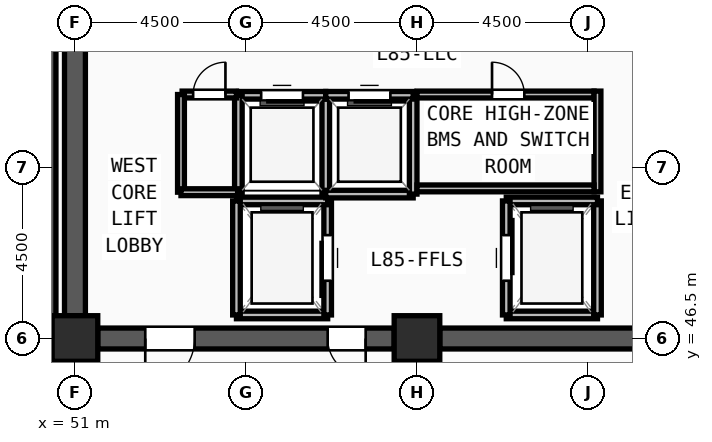
"""IFC4 building model, lengths in metres.
Left out: names, types, materials, properties, quantities, classifications, styles, units other than length and angle.
Written with IfcOpenShell. Run it as: python <this file> out.ifc"""

import sys

from ifc_helpers import new_model, si_unit, direction, frame, frame_2d, origin, origin_2d, place, context, subcontext, project, spatial, rectangle, extrude, source, transform, mapped, element, fill, save


model = new_model("IFC4")
c1 = context("Model", 3, precision=1e-05, world=origin(), true_north=direction((0.0, 1.0)))
c2 = subcontext(c1, "Body", "Model", "MODEL_VIEW")
j1 = project(units=[si_unit("LENGTHUNIT", "METRE"), si_unit("PLANEANGLEUNIT", "RADIAN")], contexts=[c1])
p1 = place(None, origin())
s1 = spatial("IfcSite", under=j1, at=p1, CompositionType="ELEMENT")
p2 = place(p1, origin())
s2 = spatial("IfcBuilding", under=s1, at=p2, CompositionType="ELEMENT")
p3 = place(p2, frame((0.0, 0.0, 328.5)))
s3 = spatial("IfcBuildingStorey", under=s2, at=p3, CompositionType="ELEMENT", Elevation=328.5)
m1 = source(origin(), c2, "Body", "SweptSolid", [
    extrude(rectangle(XDim=1.2, YDim=1.2, at=origin_2d()), origin(), (0.0, 0.0, 1.0), 3.75),
])
for number, where, z_axis, x_axis in (
    (1, (51.0, 46.5, 0.0), (0.0, 0.0, 1.0), (1.0, 0.0, 0.0)),
    (2, (60.0, 46.5, 0.0), (0.0, 0.0, 1.0), (1.0, 0.0, 0.0)),
):
    element("IfcColumn", number, at=place(p3, frame(where, z_axis=z_axis, x_axis=x_axis)), inside=s3, PredefinedType="COLUMN", context=c2, shape_type="MappedRepresentation", body=[
        mapped(m1, transform((0.0, 0.0, 0.0), x_axis=(1.0, 0.0, 0.0), y_axis=(0.0, 1.0, 0.0), z_axis=(0.0, 0.0, 1.0), scale=1.0)),
    ])
p4 = place(p3, frame((68.4, 46.5, 0.0), z_axis=(0.0, 0.0, 1.0), x_axis=(-1.0, 0.0, 0.0)))
e3 = element("IfcWall", 3, at=p4, inside=s3, PredefinedType="SHEAR", context=c2, shape_type="SweptSolid", body=[
    extrude(rectangle(XDim=7.8, YDim=0.55, at=frame_2d((3.9, 0.0))), origin(), (0.0, 0.0, 1.0), 3.57),
])
m2 = source(origin(), c2, "Body", "SweptSolid", [
    extrude(rectangle(XDim=1.3, YDim=2.2, at=frame_2d((0.65, 1.1))), frame((0.0, 0.285, 0.0), z_axis=(0.0, -1.0, 0.0), x_axis=(1.0, 0.0, 0.0)), (0.0, 0.0, 1.0), 0.57),
])
p5 = place(p4, frame((1.25, 0.0, 0.0)))
e4 = element("IfcOpeningElement", 4, at=p5, cuts=e3, PredefinedType="OPENING", context=c2, shape_type="MappedRepresentation", body=[
    mapped(m2, transform((0.0, 0.0, 0.0), x_axis=(1.0, 0.0, 0.0), y_axis=(0.0, 1.0, 0.0), z_axis=(0.0, 0.0, 1.0), scale=1.0)),
])
p6 = place(p3, frame((59.4, 46.5, 0.0), z_axis=(0.0, 0.0, 1.0), x_axis=(-1.0, 0.0, 0.0)))
e5 = element("IfcWall", 5, at=p6, inside=s3, PredefinedType="SHEAR", context=c2, shape_type="SweptSolid", body=[
    extrude(rectangle(XDim=7.8, YDim=0.55, at=frame_2d((3.9, 0.0))), origin(), (0.0, 0.0, 1.0), 3.57),
])
p7 = place(p6, frame((5.25, 0.0, 0.0)))
e6 = element("IfcOpeningElement", 6, at=p7, cuts=e5, PredefinedType="OPENING", context=c2, shape_type="MappedRepresentation", body=[
    mapped(m2, transform((0.0, 0.0, 0.0), x_axis=(1.0, 0.0, 0.0), y_axis=(0.0, 1.0, 0.0), z_axis=(0.0, 0.0, 1.0), scale=1.0)),
])
m3 = source(origin(), c2, "Body", "SweptSolid", [
    extrude(rectangle(XDim=1.0, YDim=2.2, at=frame_2d((0.5, 1.1))), frame((0.0, 0.285, 0.0), z_axis=(0.0, -1.0, 0.0), x_axis=(1.0, 0.0, 0.0)), (0.0, 0.0, 1.0), 0.57),
])
p8 = place(p6, frame((0.75, 0.0, 0.0)))
e7 = element("IfcOpeningElement", 7, at=p8, cuts=e5, PredefinedType="OPENING", context=c2, shape_type="MappedRepresentation", body=[
    mapped(m3, transform((0.0, 0.0, 0.0), x_axis=(1.0, 0.0, 0.0), y_axis=(0.0, 1.0, 0.0), z_axis=(0.0, 0.0, 1.0), scale=1.0)),
])
p9 = place(p3, frame((51.0, 47.1, 0.0), z_axis=(0.0, 0.0, 1.0), x_axis=(0.0, 1.0, 0.0)))
e8 = element("IfcWall", 8, at=p9, inside=s3, PredefinedType="SHEAR", context=c2, shape_type="SweptSolid", body=[
    extrude(rectangle(XDim=13.8, YDim=0.55, at=frame_2d((6.9, 0.0))), origin(), (0.0, 0.0, 1.0), 3.57),
])
p10 = place(p3, frame((50.38, 46.7, 0.0), z_axis=(0.0, 0.0, 1.0), x_axis=(0.0, 1.0, 0.0)))
e9 = element("IfcWall", 9, at=p10, inside=s3, PredefinedType="SOLIDWALL", context=c2, shape_type="SweptSolid", body=[
    extrude(rectangle(XDim=7.82, YDim=0.24, at=frame_2d((3.91, 0.0))), origin(), (0.0, 0.0, 1.0), 3.57),
])
p11 = place(p3, frame((55.25, 47.12, 0.0), z_axis=(0.0, 0.0, 1.0), x_axis=(1.0, 0.0, 0.0)))
e10 = element("IfcWall", 10, at=p11, inside=s3, PredefinedType="SOLIDWALL", context=c2, shape_type="SweptSolid", body=[
    extrude(rectangle(XDim=2.4, YDim=0.2, at=frame_2d((1.2, 0.0))), origin(), (0.0, 0.0, 1.0), 3.57),
])
p12 = place(p3, frame((57.65, 47.12, 0.0), z_axis=(0.0, 0.0, 1.0), x_axis=(0.0, 1.0, 0.0)))
e11 = element("IfcWall", 11, at=p12, inside=s3, PredefinedType="SOLIDWALL", context=c2, shape_type="SweptSolid", body=[
    extrude(rectangle(XDim=3.0, YDim=0.2, at=frame_2d((1.5, 0.0))), origin(), (0.0, 0.0, 1.0), 3.57),
])
m4 = source(origin(), c2, "Body", "SweptSolid", [
    extrude(rectangle(XDim=1.2, YDim=2.3, at=frame_2d((0.6, 1.15))), frame((0.0, 0.11, 0.0), z_axis=(0.0, -1.0, 0.0), x_axis=(1.0, 0.0, 0.0)), (0.0, 0.0, 1.0), 0.22),
])
p13 = place(p12, frame((0.9, 0.0, 0.0)))
e12 = element("IfcOpeningElement", 12, at=p13, cuts=e11, PredefinedType="OPENING", context=c2, shape_type="MappedRepresentation", body=[
    mapped(m4, transform((0.0, 0.0, 0.0), x_axis=(1.0, 0.0, 0.0), y_axis=(0.0, 1.0, 0.0), z_axis=(0.0, 0.0, 1.0), scale=1.0)),
])
p14 = place(p3, frame((57.65, 50.12, 0.0), z_axis=(0.0, 0.0, 1.0), x_axis=(-1.0, 0.0, 0.0)))
e13 = element("IfcWall", 13, at=p14, inside=s3, PredefinedType="SOLIDWALL", context=c2, shape_type="SweptSolid", body=[
    extrude(rectangle(XDim=2.4, YDim=0.2, at=frame_2d((1.2, 0.0))), origin(), (0.0, 0.0, 1.0), 3.57),
])
p15 = place(p3, frame((55.25, 50.12, 0.0), z_axis=(0.0, 0.0, 1.0), x_axis=(0.0, -1.0, 0.0)))
e14 = element("IfcWall", 14, at=p15, inside=s3, PredefinedType="SOLIDWALL", context=c2, shape_type="SweptSolid", body=[
    extrude(rectangle(XDim=3.0, YDim=0.2, at=frame_2d((1.5, 0.0))), origin(), (0.0, 0.0, 1.0), 3.57),
])
p16 = place(p3, frame((62.35, 47.12, 0.0), z_axis=(0.0, 0.0, 1.0), x_axis=(1.0, 0.0, 0.0)))
e15 = element("IfcWall", 15, at=p16, inside=s3, PredefinedType="SOLIDWALL", context=c2, shape_type="SweptSolid", body=[
    extrude(rectangle(XDim=2.4, YDim=0.2, at=frame_2d((1.2, 0.0))), origin(), (0.0, 0.0, 1.0), 3.57),
])
p17 = place(p3, frame((64.75, 47.12, 0.0), z_axis=(0.0, 0.0, 1.0), x_axis=(0.0, 1.0, 0.0)))
e16 = element("IfcWall", 16, at=p17, inside=s3, PredefinedType="SOLIDWALL", context=c2, shape_type="SweptSolid", body=[
    extrude(rectangle(XDim=3.0, YDim=0.2, at=frame_2d((1.5, 0.0))), origin(), (0.0, 0.0, 1.0), 3.57),
])
p18 = place(p3, frame((64.75, 50.12, 0.0), z_axis=(0.0, 0.0, 1.0), x_axis=(-1.0, 0.0, 0.0)))
e17 = element("IfcWall", 17, at=p18, inside=s3, PredefinedType="SOLIDWALL", context=c2, shape_type="SweptSolid", body=[
    extrude(rectangle(XDim=2.4, YDim=0.2, at=frame_2d((1.2, 0.0))), origin(), (0.0, 0.0, 1.0), 3.57),
])
p19 = place(p3, frame((62.35, 50.12, 0.0), z_axis=(0.0, 0.0, 1.0), x_axis=(0.0, -1.0, 0.0)))
e18 = element("IfcWall", 18, at=p19, inside=s3, PredefinedType="SOLIDWALL", context=c2, shape_type="SweptSolid", body=[
    extrude(rectangle(XDim=3.0, YDim=0.2, at=frame_2d((1.5, 0.0))), origin(), (0.0, 0.0, 1.0), 3.57),
])
p20 = place(p19, frame((0.9, 0.0, 0.0)))
e19 = element("IfcOpeningElement", 19, at=p20, cuts=e18, PredefinedType="OPENING", context=c2, shape_type="MappedRepresentation", body=[
    mapped(m4, transform((0.0, 0.0, 0.0), x_axis=(1.0, 0.0, 0.0), y_axis=(0.0, 1.0, 0.0), z_axis=(0.0, 0.0, 1.0), scale=1.0)),
])
p21 = place(p3, frame((57.6, 50.3, 0.0), z_axis=(0.0, 0.0, 1.0), x_axis=(0.0, 1.0, 0.0)))
e20 = element("IfcWall", 20, at=p21, inside=s3, PredefinedType="SOLIDWALL", context=c2, shape_type="SweptSolid", body=[
    extrude(rectangle(XDim=2.6, YDim=0.2, at=frame_2d((1.3, 0.0))), origin(), (0.0, 0.0, 1.0), 3.57),
])
p22 = place(p3, frame((57.6, 52.9, 0.0), z_axis=(0.0, 0.0, 1.0), x_axis=(-1.0, 0.0, 0.0)))
e21 = element("IfcWall", 21, at=p22, inside=s3, PredefinedType="SOLIDWALL", context=c2, shape_type="SweptSolid", body=[
    extrude(rectangle(XDim=2.3, YDim=0.2, at=frame_2d((1.15, 0.0))), origin(), (0.0, 0.0, 1.0), 3.57),
])
m5 = source(origin(), c2, "Body", "SweptSolid", [
    extrude(rectangle(XDim=1.1, YDim=2.2, at=frame_2d((0.55, 1.1))), frame((0.0, 0.11, 0.0), z_axis=(0.0, -1.0, 0.0), x_axis=(1.0, 0.0, 0.0)), (0.0, 0.0, 1.0), 0.22),
])
p23 = place(p22, frame((0.6, 0.0, 0.0)))
e22 = element("IfcOpeningElement", 22, at=p23, cuts=e21, PredefinedType="OPENING", context=c2, shape_type="MappedRepresentation", body=[
    mapped(m5, transform((0.0, 0.0, 0.0), x_axis=(1.0, 0.0, 0.0), y_axis=(0.0, 1.0, 0.0), z_axis=(0.0, 0.0, 1.0), scale=1.0)),
])
p24 = place(p3, frame((55.3, 52.9, 0.0), z_axis=(0.0, 0.0, 1.0), x_axis=(0.0, -1.0, 0.0)))
e23 = element("IfcWall", 23, at=p24, inside=s3, PredefinedType="SOLIDWALL", context=c2, shape_type="SweptSolid", body=[
    extrude(rectangle(XDim=2.6, YDim=0.2, at=frame_2d((1.3, 0.0))), origin(), (0.0, 0.0, 1.0), 3.57),
])
p25 = place(p3, frame((57.6, 50.3, 0.0), z_axis=(0.0, 0.0, 1.0), x_axis=(1.0, 0.0, 0.0)))
e24 = element("IfcWall", 24, at=p25, inside=s3, PredefinedType="SOLIDWALL", context=c2, shape_type="SweptSolid", body=[
    extrude(rectangle(XDim=2.3, YDim=0.2, at=frame_2d((1.15, 0.0))), origin(), (0.0, 0.0, 1.0), 3.57),
])
p26 = place(p3, frame((59.9, 50.3, 0.0), z_axis=(0.0, 0.0, 1.0), x_axis=(0.0, 1.0, 0.0)))
e25 = element("IfcWall", 25, at=p26, inside=s3, PredefinedType="SOLIDWALL", context=c2, shape_type="SweptSolid", body=[
    extrude(rectangle(XDim=2.6, YDim=0.2, at=frame_2d((1.3, 0.0))), origin(), (0.0, 0.0, 1.0), 3.57),
])
p27 = place(p3, frame((59.9, 52.9, 0.0), z_axis=(0.0, 0.0, 1.0), x_axis=(-1.0, 0.0, 0.0)))
e26 = element("IfcWall", 26, at=p27, inside=s3, PredefinedType="SOLIDWALL", context=c2, shape_type="SweptSolid", body=[
    extrude(rectangle(XDim=2.3, YDim=0.2, at=frame_2d((1.15, 0.0))), origin(), (0.0, 0.0, 1.0), 3.57),
])
p28 = place(p27, frame((0.6, 0.0, 0.0)))
e27 = element("IfcOpeningElement", 27, at=p28, cuts=e26, PredefinedType="OPENING", context=c2, shape_type="MappedRepresentation", body=[
    mapped(m5, transform((0.0, 0.0, 0.0), x_axis=(1.0, 0.0, 0.0), y_axis=(0.0, 1.0, 0.0), z_axis=(0.0, 0.0, 1.0), scale=1.0)),
])
p29 = place(p3, frame((60.0, 52.92, 0.0), z_axis=(0.0, 0.0, 1.0), x_axis=(1.0, 0.0, 0.0)))
e28 = element("IfcWall", 28, at=p29, inside=s3, PredefinedType="PARTITIONING", context=c2, shape_type="SweptSolid", body=[
    extrude(rectangle(XDim=4.66, YDim=0.18, at=frame_2d((2.33, 0.0))), origin(), (0.0, 0.0, 1.0), 3.57),
])
m6 = source(origin(), c2, "Body", "SweptSolid", [
    extrude(rectangle(XDim=0.85, YDim=2.1, at=frame_2d((0.425, 1.05))), frame((0.0, 0.1, 0.0), z_axis=(0.0, -1.0, 0.0), x_axis=(1.0, 0.0, 0.0)), (0.0, 0.0, 1.0), 0.2),
])
p30 = place(p29, frame((1.975, 0.0, 0.0)))
e29 = element("IfcOpeningElement", 29, at=p30, cuts=e28, PredefinedType="OPENING", context=c2, shape_type="MappedRepresentation", body=[
    mapped(m6, transform((0.0, 0.0, 0.0), x_axis=(1.0, 0.0, 0.0), y_axis=(0.0, 1.0, 0.0), z_axis=(0.0, 0.0, 1.0), scale=1.0)),
])
p31 = place(p3, frame((53.82, 52.92, 0.0), z_axis=(0.0, 0.0, 1.0), x_axis=(1.0, 0.0, 0.0)))
e30 = element("IfcWall", 30, at=p31, inside=s3, PredefinedType="PARTITIONING", context=c2, shape_type="SweptSolid", body=[
    extrude(rectangle(XDim=1.43, YDim=0.18, at=frame_2d((0.715, 0.0))), origin(), (0.0, 0.0, 1.0), 3.57),
])
p32 = place(p31, frame((0.29, 0.0, 0.0)))
e31 = element("IfcOpeningElement", 31, at=p32, cuts=e30, PredefinedType="OPENING", context=c2, shape_type="MappedRepresentation", body=[
    mapped(m6, transform((0.0, 0.0, 0.0), x_axis=(1.0, 0.0, 0.0), y_axis=(0.0, 1.0, 0.0), z_axis=(0.0, 0.0, 1.0), scale=1.0)),
])
p33 = place(p3, frame((53.79, 50.35, 0.0), z_axis=(0.0, 0.0, 1.0), x_axis=(0.0, 1.0, 0.0)))
e32 = element("IfcWall", 32, at=p33, inside=s3, PredefinedType="PARTITIONING", context=c2, shape_type="SweptSolid", body=[
    extrude(rectangle(XDim=2.57, YDim=0.18, at=frame_2d((1.285, 0.0))), origin(), (0.0, 0.0, 1.0), 3.57),
])
p34 = place(p3, frame((53.79, 50.35, 0.0), z_axis=(0.0, 0.0, 1.0), x_axis=(1.0, 0.0, 0.0)))
e33 = element("IfcWall", 33, at=p34, inside=s3, PredefinedType="PARTITIONING", context=c2, shape_type="SweptSolid", body=[
    extrude(rectangle(XDim=1.49, YDim=0.18, at=frame_2d((0.745, 0.0))), origin(), (0.0, 0.0, 1.0), 3.57),
])
p35 = place(p3, frame((64.75, 50.36, 0.0), z_axis=(0.0, 0.0, 1.0), x_axis=(0.0, 1.0, 0.0)))
e34 = element("IfcWall", 34, at=p35, inside=s3, PredefinedType="PARTITIONING", context=c2, shape_type="SweptSolid", body=[
    extrude(rectangle(XDim=2.65, YDim=0.18, at=frame_2d((1.325, 0.0))), origin(), (0.0, 0.0, 1.0), 3.57),
])
p36 = place(p3, frame((60.0, 50.45, 0.0), z_axis=(0.0, 0.0, 1.0), x_axis=(1.0, 0.0, 0.0)))
e35 = element("IfcWall", 35, at=p36, inside=s3, PredefinedType="PARTITIONING", context=c2, shape_type="SweptSolid", body=[
    extrude(rectangle(XDim=4.66, YDim=0.18, at=frame_2d((2.33, 0.0))), origin(), (0.0, 0.0, 1.0), 3.57),
])
m7 = source(origin(), c2, "Body", "SweptSolid", [
    extrude(rectangle(XDim=1.3, YDim=2.2, at=frame_2d((0.65, 1.1))), frame((0.0, 0.025, 0.0), z_axis=(0.0, -1.0, 0.0), x_axis=(1.0, 0.0, 0.0)), (0.0, 0.0, 1.0), 0.05),
])
p37 = place(p7, origin())
e36 = element("IfcDoor", 36, at=p37, inside=s3, OperationType="SINGLE_SWING_RIGHT", PredefinedType="DOOR", context=c2, shape_type="MappedRepresentation", body=[
    mapped(m7, transform((0.0, 0.0, 0.0), x_axis=(1.0, 0.0, 0.0), y_axis=(0.0, 1.0, 0.0), z_axis=(0.0, 0.0, 1.0), scale=1.0)),
])
fill(e6, e36)
m8 = source(origin(), c2, "Body", "SweptSolid", [
    extrude(rectangle(XDim=1.0, YDim=2.2, at=frame_2d((0.5, 1.1))), frame((0.0, 0.025, 0.0), z_axis=(0.0, -1.0, 0.0), x_axis=(1.0, 0.0, 0.0)), (0.0, 0.0, 1.0), 0.05),
])
p38 = place(p8, origin())
e37 = element("IfcDoor", 37, at=p38, inside=s3, OperationType="SINGLE_SWING_LEFT", PredefinedType="DOOR", context=c2, shape_type="MappedRepresentation", body=[
    mapped(m8, transform((0.0, 0.0, 0.0), x_axis=(1.0, 0.0, 0.0), y_axis=(0.0, 1.0, 0.0), z_axis=(0.0, 0.0, 1.0), scale=1.0)),
])
fill(e7, e37)
m9 = source(origin(), c2, "Body", "SweptSolid", [
    extrude(rectangle(XDim=1.2, YDim=2.3, at=frame_2d((0.6, 1.15))), frame((0.0, 0.025, 0.0), z_axis=(0.0, -1.0, 0.0), x_axis=(1.0, 0.0, 0.0)), (0.0, 0.0, 1.0), 0.05),
])
p39 = place(p13, origin())
e38 = element("IfcDoor", 38, at=p39, inside=s3, OperationType="SLIDING_TO_LEFT", PredefinedType="DOOR", context=c2, shape_type="MappedRepresentation", body=[
    mapped(m9, transform((0.0, 0.0, 0.0), x_axis=(1.0, 0.0, 0.0), y_axis=(0.0, 1.0, 0.0), z_axis=(0.0, 0.0, 1.0), scale=1.0)),
])
fill(e12, e38)
p40 = place(p20, origin())
e39 = element("IfcDoor", 39, at=p40, inside=s3, OperationType="SLIDING_TO_LEFT", PredefinedType="DOOR", context=c2, shape_type="MappedRepresentation", body=[
    mapped(m9, transform((0.0, 0.0, 0.0), x_axis=(1.0, 0.0, 0.0), y_axis=(0.0, 1.0, 0.0), z_axis=(0.0, 0.0, 1.0), scale=1.0)),
])
fill(e19, e39)
m10 = source(origin(), c2, "Body", "SweptSolid", [
    extrude(rectangle(XDim=1.1, YDim=2.2, at=frame_2d((0.55, 1.1))), frame((0.0, 0.025, 0.0), z_axis=(0.0, -1.0, 0.0), x_axis=(1.0, 0.0, 0.0)), (0.0, 0.0, 1.0), 0.05),
])
p41 = place(p23, origin())
e40 = element("IfcDoor", 40, at=p41, inside=s3, OperationType="SLIDING_TO_LEFT", PredefinedType="DOOR", context=c2, shape_type="MappedRepresentation", body=[
    mapped(m10, transform((0.0, 0.0, 0.0), x_axis=(1.0, 0.0, 0.0), y_axis=(0.0, 1.0, 0.0), z_axis=(0.0, 0.0, 1.0), scale=1.0)),
])
fill(e22, e40)
p42 = place(p28, origin())
e41 = element("IfcDoor", 41, at=p42, inside=s3, OperationType="SLIDING_TO_LEFT", PredefinedType="DOOR", context=c2, shape_type="MappedRepresentation", body=[
    mapped(m10, transform((0.0, 0.0, 0.0), x_axis=(1.0, 0.0, 0.0), y_axis=(0.0, 1.0, 0.0), z_axis=(0.0, 0.0, 1.0), scale=1.0)),
])
fill(e27, e41)
m11 = source(origin(), c2, "Body", "SweptSolid", [
    extrude(rectangle(XDim=0.85, YDim=2.1, at=frame_2d((0.425, 1.05))), frame((0.0, 0.025, 0.0), z_axis=(0.0, -1.0, 0.0), x_axis=(1.0, 0.0, 0.0)), (0.0, 0.0, 1.0), 0.05),
])
p43 = place(p30, origin())
e42 = element("IfcDoor", 42, at=p43, inside=s3, OperationType="SINGLE_SWING_LEFT", PredefinedType="DOOR", context=c2, shape_type="MappedRepresentation", body=[
    mapped(m11, transform((0.0, 0.0, 0.0), x_axis=(1.0, 0.0, 0.0), y_axis=(0.0, 1.0, 0.0), z_axis=(0.0, 0.0, 1.0), scale=1.0)),
])
fill(e29, e42)
p44 = place(p32, origin())
e43 = element("IfcDoor", 43, at=p44, inside=s3, OperationType="SINGLE_SWING_RIGHT", PredefinedType="DOOR", context=c2, shape_type="MappedRepresentation", body=[
    mapped(m11, transform((0.0, 0.0, 0.0), x_axis=(1.0, 0.0, 0.0), y_axis=(0.0, 1.0, 0.0), z_axis=(0.0, 0.0, 1.0), scale=1.0)),
])
fill(e31, e43)
save(model, sys.argv[1])
